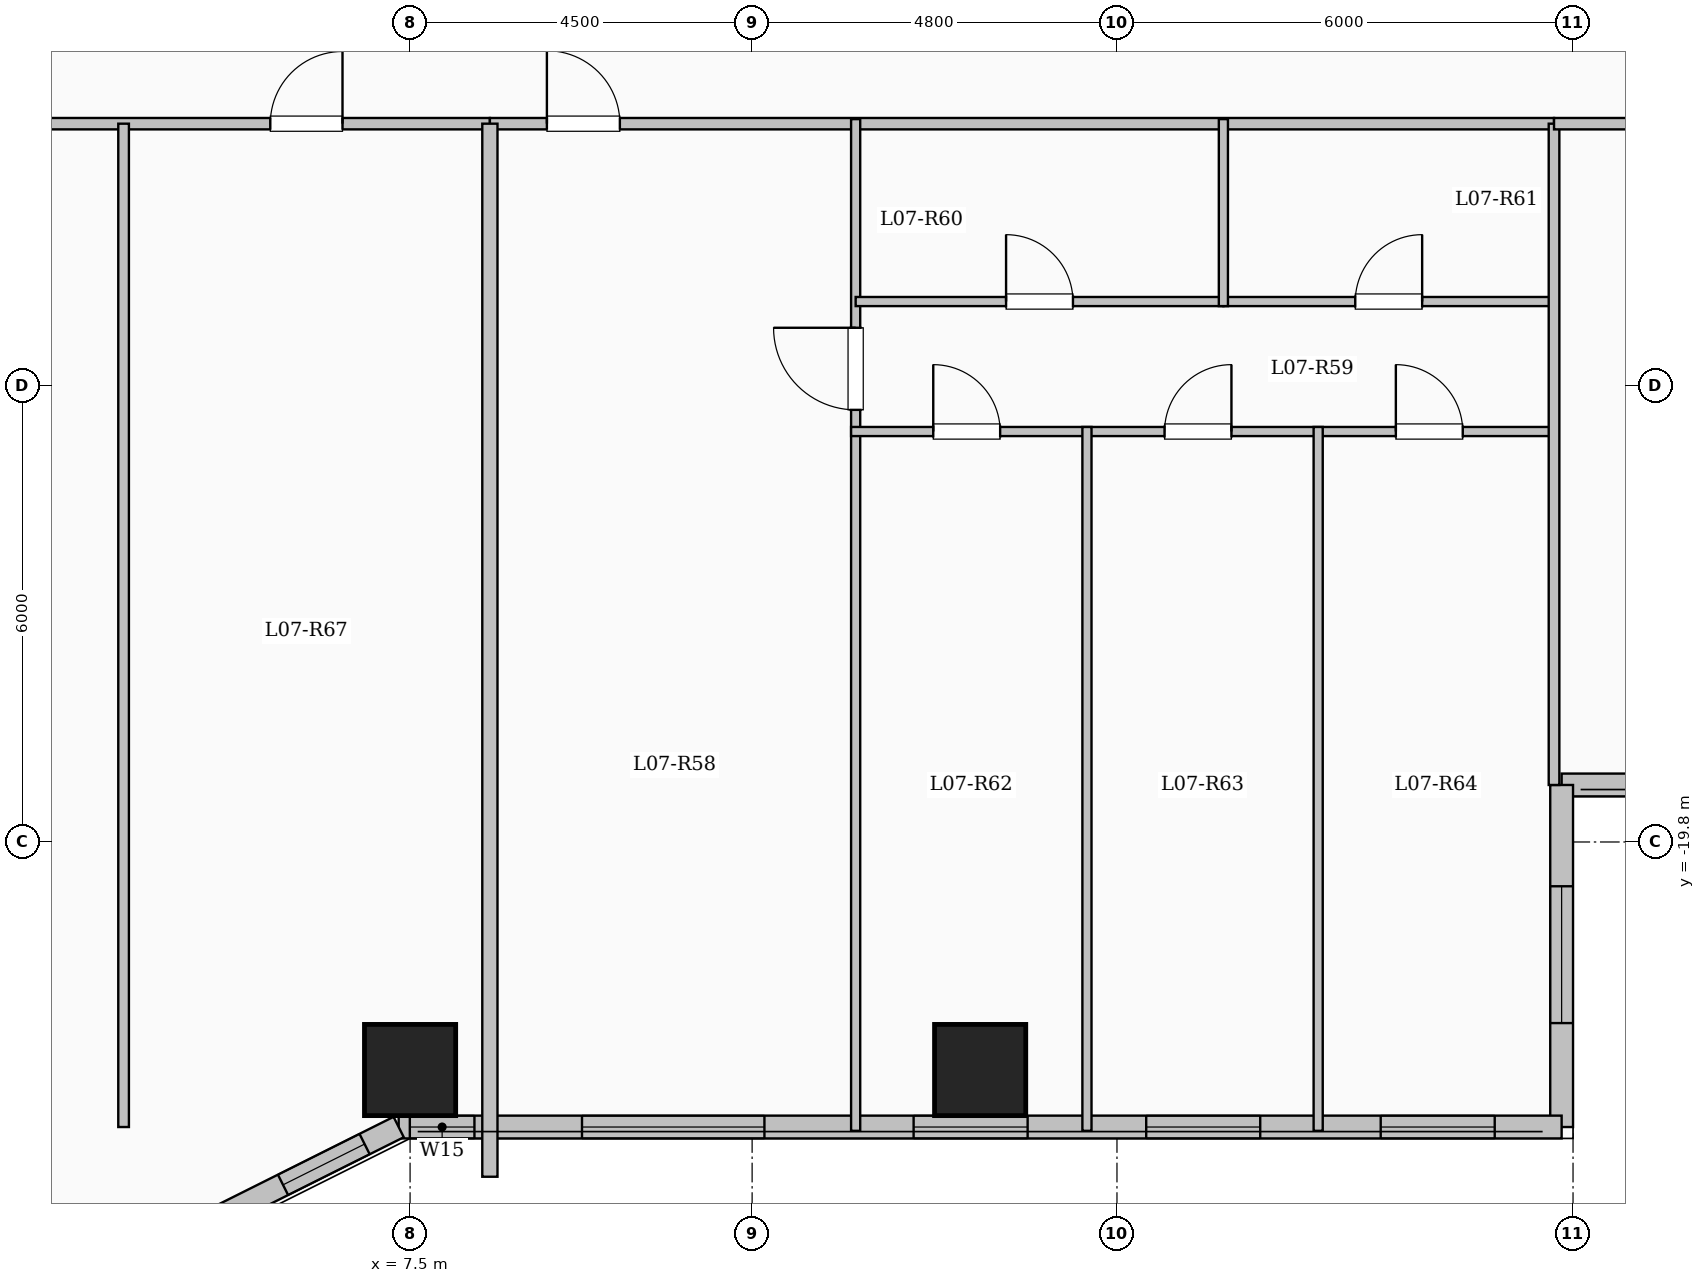
"""IFC4 building model, lengths in metres.
Left out: names, types, materials, properties, quantities, classifications, styles, units other than length and angle.
Written with IfcOpenShell. Run it as: python <this file> out.ifc"""

import sys

from ifc_helpers import new_model, si_unit, direction, frame, frame_2d, origin, origin_2d, place, context, subcontext, project, spatial, rectangle, extrude, element, fill, save


model = new_model("IFC4")
c1 = context("Model", 3, precision=1e-05, world=origin(), true_north=direction((0.0, 1.0)))
c2 = subcontext(c1, "Body", "Model", "MODEL_VIEW")
j1 = project(units=[si_unit("LENGTHUNIT", "METRE"), si_unit("PLANEANGLEUNIT", "RADIAN")], contexts=[c1])
p1 = place(None, origin())
s1 = spatial("IfcSite", under=j1, at=p1, CompositionType="ELEMENT")
p2 = place(p1, origin())
s2 = spatial("IfcBuilding", under=s1, at=p2, CompositionType="ELEMENT")
p3 = place(p2, frame((0.0, 0.0, 30.7)))
s3 = spatial("IfcBuildingStorey", under=s2, at=p3, CompositionType="ELEMENT", Elevation=30.7)
for number, where, z_axis, x_axis in (
    (1, (7.5, -22.8, 0.0), (0.0, 0.0, 1.0), (1.0, 0.0, 0.0)),
    (2, (15.0, -22.8, 0.0), (0.0, 0.0, 1.0), (1.0, 0.0, 0.0)),
):
    element("IfcColumn", number, at=place(p3, frame(where, z_axis=z_axis, x_axis=x_axis)), inside=s3, PredefinedType="COLUMN", context=c2, shape_type="SweptSolid", body=[
        extrude(rectangle(XDim=1.2, YDim=1.2, at=origin_2d()), origin(), (0.0, 0.0, 1.0), 3.35),
    ])
p4 = place(p3, frame((28.65, -19.05, 0.0), z_axis=(0.0, 0.0, 1.0), x_axis=(-1.0, 0.0, 0.0)))
e3 = element("IfcWall", 3, at=p4, inside=s3, PredefinedType="SOLIDWALL", context=c2, shape_type="SweptSolid", body=[
    extrude(rectangle(XDim=6.0, YDim=0.3, at=frame_2d((3.0, 0.0))), origin(), (0.0, 0.0, 1.0), 3.1),
])
p5 = place(p4, frame((1.825, 0.0, 0.9)))
e4 = element("IfcOpeningElement", 4, at=p5, cuts=e3, PredefinedType="OPENING", context=c2, shape_type="SweptSolid", body=[
    extrude(rectangle(XDim=2.4, YDim=1.8, at=frame_2d((1.2, 0.9))), frame((0.0, 0.16, 0.0), z_axis=(0.0, -1.0, 0.0), x_axis=(1.0, 0.0, 0.0)), (0.0, 0.0, 1.0), 0.32),
])
p6 = place(p3, frame((22.65, -19.05, 0.0), z_axis=(0.0, 0.0, 1.0), x_axis=(0.0, -1.0, 0.0)))
e5 = element("IfcWall", 5, at=p6, inside=s3, PredefinedType="SOLIDWALL", context=c2, shape_type="SweptSolid", body=[
    extrude(rectangle(XDim=4.5, YDim=0.3, at=frame_2d((2.25, 0.0))), origin(), (0.0, 0.0, 1.0), 3.1),
])
p7 = place(p6, frame((1.333, 0.0, 0.9)))
e6 = element("IfcOpeningElement", 6, at=p7, cuts=e5, PredefinedType="OPENING", context=c2, shape_type="SweptSolid", body=[
    extrude(rectangle(XDim=1.8, YDim=1.65, at=frame_2d((0.9, 0.825))), frame((0.0, 0.16, 0.0), z_axis=(0.0, -1.0, 0.0), x_axis=(1.0, 0.0, 0.0)), (0.0, 0.0, 1.0), 0.32),
])
p8 = place(p3, frame((22.65, -23.55, 0.0), z_axis=(0.0, 0.0, 1.0), x_axis=(-1.0, 0.0, 0.0)))
e7 = element("IfcWall", 7, at=p8, inside=s3, PredefinedType="SOLIDWALL", context=c2, shape_type="SweptSolid", body=[
    extrude(rectangle(XDim=15.3, YDim=0.3, at=frame_2d((7.65, 0.0))), origin(), (0.0, 0.0, 1.0), 3.1),
])
p9 = place(p8, frame((0.88, 0.0, 0.9)))
e8 = element("IfcOpeningElement", 8, at=p9, cuts=e7, PredefinedType="OPENING", context=c2, shape_type="SweptSolid", body=[
    extrude(rectangle(XDim=1.5, YDim=1.65, at=frame_2d((0.75, 0.825))), frame((0.0, 0.16, 0.0), z_axis=(0.0, -1.0, 0.0), x_axis=(1.0, 0.0, 0.0)), (0.0, 0.0, 1.0), 0.32),
])
p10 = place(p8, frame((3.965, 0.0, 0.9)))
e9 = element("IfcOpeningElement", 9, at=p10, cuts=e7, PredefinedType="OPENING", context=c2, shape_type="SweptSolid", body=[
    extrude(rectangle(XDim=1.5, YDim=1.65, at=frame_2d((0.75, 0.825))), frame((0.0, 0.16, 0.0), z_axis=(0.0, -1.0, 0.0), x_axis=(1.0, 0.0, 0.0)), (0.0, 0.0, 1.0), 0.32),
])
p11 = place(p8, frame((7.025, 0.0, 0.9)))
e10 = element("IfcOpeningElement", 10, at=p11, cuts=e7, PredefinedType="OPENING", context=c2, shape_type="SweptSolid", body=[
    extrude(rectangle(XDim=1.5, YDim=1.65, at=frame_2d((0.75, 0.825))), frame((0.0, 0.16, 0.0), z_axis=(0.0, -1.0, 0.0), x_axis=(1.0, 0.0, 0.0)), (0.0, 0.0, 1.0), 0.32),
])
p12 = place(p8, frame((10.488, 0.0, 0.9)))
e11 = element("IfcOpeningElement", 11, at=p12, cuts=e7, PredefinedType="OPENING", context=c2, shape_type="SweptSolid", body=[
    extrude(rectangle(XDim=2.4, YDim=1.8, at=frame_2d((1.2, 0.9))), frame((0.0, 0.16, 0.0), z_axis=(0.0, -1.0, 0.0), x_axis=(1.0, 0.0, 0.0)), (0.0, 0.0, 1.0), 0.32),
])
p13 = place(p8, frame((14.303, 0.0, 0.95)))
e12 = element("IfcOpeningElement", 12, at=p13, cuts=e7, PredefinedType="OPENING", context=c2, shape_type="SweptSolid", body=[
    extrude(rectangle(XDim=0.85, YDim=1.5, at=frame_2d((0.425, 0.75))), frame((0.0, 0.16, 0.0), z_axis=(0.0, -1.0, 0.0), x_axis=(1.0, 0.0, 0.0)), (0.0, 0.0, 1.0), 0.32),
])
p14 = place(p3, frame((7.35, -23.55, 0.0), z_axis=(0.0, 0.0, 1.0), x_axis=(-0.894427191, -0.4472135955, 0.0)))
e13 = element("IfcWall", 13, at=p14, inside=s3, PredefinedType="SOLIDWALL", context=c2, shape_type="SweptSolid", body=[
    extrude(rectangle(XDim=3.354, YDim=0.3, at=frame_2d((1.677, 0.0))), origin(), (0.0, 0.0, 1.0), 3.1),
])
p15 = place(p14, frame((0.501, 0.0, 0.95)))
e14 = element("IfcOpeningElement", 14, at=p15, cuts=e13, PredefinedType="OPENING", context=c2, shape_type="SweptSolid", body=[
    extrude(rectangle(XDim=1.2, YDim=1.5, at=frame_2d((0.6, 0.75))), frame((0.0, 0.16, 0.0), z_axis=(0.0, -1.0, 0.0), x_axis=(1.0, 0.0, 0.0)), (0.0, 0.0, 1.0), 0.32),
])
p16 = place(p3, frame((-8.55, -10.35, 0.0), z_axis=(0.0, 0.0, 1.0), x_axis=(1.0, 0.0, 0.0)))
e15 = element("IfcWall", 15, at=p16, inside=s3, PredefinedType="PARTITIONING", context=c2, shape_type="SweptSolid", body=[
    extrude(rectangle(XDim=17.1, YDim=0.15, at=frame_2d((8.55, 0.0))), origin(), (0.0, 0.0, 1.0), 3.1),
])
p17 = place(p16, frame((2.618, 0.0, 0.0)))
e16 = element("IfcOpeningElement", 16, at=p17, cuts=e15, PredefinedType="OPENING", context=c2, shape_type="SweptSolid", body=[
    extrude(rectangle(XDim=0.95, YDim=2.15, at=frame_2d((0.475, 1.075))), frame((0.0, 0.085, 0.0), z_axis=(0.0, -1.0, 0.0), x_axis=(1.0, 0.0, 0.0)), (0.0, 0.0, 1.0), 0.17),
])
p18 = place(p16, frame((8.754, 0.0, 0.0)))
e17 = element("IfcOpeningElement", 17, at=p18, cuts=e15, PredefinedType="OPENING", context=c2, shape_type="SweptSolid", body=[
    extrude(rectangle(XDim=0.95, YDim=2.15, at=frame_2d((0.475, 1.075))), frame((0.0, 0.085, 0.0), z_axis=(0.0, -1.0, 0.0), x_axis=(1.0, 0.0, 0.0)), (0.0, 0.0, 1.0), 0.17),
])
p19 = place(p16, frame((14.211, 0.0, 0.0)))
e18 = element("IfcOpeningElement", 18, at=p19, cuts=e15, PredefinedType="OPENING", context=c2, shape_type="SweptSolid", body=[
    extrude(rectangle(XDim=0.95, YDim=2.15, at=frame_2d((0.475, 1.075))), frame((0.0, 0.085, 0.0), z_axis=(0.0, -1.0, 0.0), x_axis=(1.0, 0.0, 0.0)), (0.0, 0.0, 1.0), 0.17),
])
p20 = place(p3, frame((8.55, -10.35, 0.0), z_axis=(0.0, 0.0, 1.0), x_axis=(1.0, 0.0, 0.0)))
e19 = element("IfcWall", 19, at=p20, inside=s3, PredefinedType="PARTITIONING", context=c2, shape_type="SweptSolid", body=[
    extrude(rectangle(XDim=14.0, YDim=0.15, at=frame_2d((7.0, 0.0))), origin(), (0.0, 0.0, 1.0), 3.1),
])
p21 = place(p20, frame((0.75, 0.0, 0.0)))
e20 = element("IfcOpeningElement", 20, at=p21, cuts=e19, PredefinedType="OPENING", context=c2, shape_type="SweptSolid", body=[
    extrude(rectangle(XDim=0.96, YDim=2.15, at=frame_2d((0.48, 1.075))), frame((0.0, 0.085, 0.0), z_axis=(0.0, -1.0, 0.0), x_axis=(1.0, 0.0, 0.0)), (0.0, 0.0, 1.0), 0.17),
])
p22 = place(p3, frame((13.362, -23.6, 0.0), z_axis=(0.0, 0.0, 1.0), x_axis=(0.0, 1.0, 0.0)))
e21 = element("IfcWall", 21, at=p22, inside=s3, PredefinedType="PARTITIONING", context=c2, shape_type="SweptSolid", body=[
    extrude(rectangle(XDim=13.31, YDim=0.12, at=frame_2d((6.655, 0.0))), origin(), (0.0, 0.0, 1.0), 3.1),
])
p23 = place(p22, frame((9.485, 0.0, 0.0)))
e22 = element("IfcOpeningElement", 22, at=p23, cuts=e21, PredefinedType="OPENING", context=c2, shape_type="SweptSolid", body=[
    extrude(rectangle(XDim=1.08, YDim=2.15, at=frame_2d((0.54, 1.075))), frame((0.0, 0.07, 0.0), z_axis=(0.0, -1.0, 0.0), x_axis=(1.0, 0.0, 0.0)), (0.0, 0.0, 1.0), 0.14),
])
p24 = place(p3, frame((13.362, -12.69, 0.0), z_axis=(0.0, 0.0, 1.0), x_axis=(1.0, 0.0, 0.0)))
e23 = element("IfcWall", 23, at=p24, inside=s3, PredefinedType="PARTITIONING", context=c2, shape_type="SweptSolid", body=[
    extrude(rectangle(XDim=4.838, YDim=0.12, at=frame_2d((2.419, 0.0))), origin(), (0.0, 0.0, 1.0), 2.585),
])
p25 = place(p24, frame((1.979, 0.0, 0.0)))
e24 = element("IfcOpeningElement", 24, at=p25, cuts=e23, PredefinedType="OPENING", context=c2, shape_type="SweptSolid", body=[
    extrude(rectangle(XDim=0.88, YDim=2.1, at=frame_2d((0.44, 1.05))), frame((0.0, 0.07, 0.0), z_axis=(0.0, -1.0, 0.0), x_axis=(1.0, 0.0, 0.0)), (0.0, 0.0, 1.0), 0.14),
])
p26 = place(p3, frame((18.2, -12.69, 0.0), z_axis=(0.0, 0.0, 1.0), x_axis=(1.0, 0.0, 0.0)))
e25 = element("IfcWall", 25, at=p26, inside=s3, PredefinedType="PARTITIONING", context=c2, shape_type="SweptSolid", body=[
    extrude(rectangle(XDim=4.35, YDim=0.12, at=frame_2d((2.175, 0.0))), origin(), (0.0, 0.0, 1.0), 3.1),
])
p27 = place(p26, frame((1.735, 0.0, 0.0)))
e26 = element("IfcOpeningElement", 26, at=p27, cuts=e25, PredefinedType="OPENING", context=c2, shape_type="SweptSolid", body=[
    extrude(rectangle(XDim=0.88, YDim=2.1, at=frame_2d((0.44, 1.05))), frame((0.0, 0.07, 0.0), z_axis=(0.0, -1.0, 0.0), x_axis=(1.0, 0.0, 0.0)), (0.0, 0.0, 1.0), 0.14),
])
p28 = place(p3, frame((13.302, -14.4, 0.0), z_axis=(0.0, 0.0, 1.0), x_axis=(1.0, 0.0, 0.0)))
e27 = element("IfcWall", 27, at=p28, inside=s3, PredefinedType="PARTITIONING", context=c2, shape_type="SweptSolid", body=[
    extrude(rectangle(XDim=9.308, YDim=0.12, at=frame_2d((4.654, 0.0))), origin(), (0.0, 0.0, 1.0), 3.1),
])
p29 = place(p28, frame((1.081, 0.0, 0.0)))
e28 = element("IfcOpeningElement", 28, at=p29, cuts=e27, PredefinedType="OPENING", context=c2, shape_type="SweptSolid", body=[
    extrude(rectangle(XDim=0.88, YDim=2.1, at=frame_2d((0.44, 1.05))), frame((0.0, 0.07, 0.0), z_axis=(0.0, -1.0, 0.0), x_axis=(1.0, 0.0, 0.0)), (0.0, 0.0, 1.0), 0.14),
])
p30 = place(p28, frame((4.124, 0.0, 0.0)))
e29 = element("IfcOpeningElement", 29, at=p30, cuts=e27, PredefinedType="OPENING", context=c2, shape_type="SweptSolid", body=[
    extrude(rectangle(XDim=0.88, YDim=2.1, at=frame_2d((0.44, 1.05))), frame((0.0, 0.07, 0.0), z_axis=(0.0, -1.0, 0.0), x_axis=(1.0, 0.0, 0.0)), (0.0, 0.0, 1.0), 0.14),
])
p31 = place(p28, frame((7.167, 0.0, 0.0)))
e30 = element("IfcOpeningElement", 30, at=p31, cuts=e27, PredefinedType="OPENING", context=c2, shape_type="SweptSolid", body=[
    extrude(rectangle(XDim=0.88, YDim=2.1, at=frame_2d((0.44, 1.05))), frame((0.0, 0.07, 0.0), z_axis=(0.0, -1.0, 0.0), x_axis=(1.0, 0.0, 0.0)), (0.0, 0.0, 1.0), 0.14),
])
p32 = place(p3, frame((18.2, -12.75, 0.0), z_axis=(0.0, 0.0, 1.0), x_axis=(0.0, 1.0, 0.0)))
e31 = element("IfcWall", 31, at=p32, inside=s3, PredefinedType="PARTITIONING", context=c2, shape_type="SweptSolid", body=[
    extrude(rectangle(XDim=2.46, YDim=0.12, at=frame_2d((1.23, 0.0))), origin(), (0.0, 0.0, 1.0), 3.1),
])
for number, where, z_axis, x_axis in (
    (32, (16.405, -23.6, 0.0), (0.0, 0.0, 1.0), (0.0, 1.0, 0.0)),
    (33, (19.447, -23.6, 0.0), (0.0, 0.0, 1.0), (0.0, 1.0, 0.0)),
):
    element("IfcWall", number, at=place(p3, frame(where, z_axis=z_axis, x_axis=x_axis)), inside=s3, PredefinedType="PARTITIONING", context=c2, shape_type="SweptSolid", body=[
        extrude(rectangle(XDim=9.26, YDim=0.12, at=frame_2d((4.63, 0.0))), origin(), (0.0, 0.0, 1.0), 3.1),
    ])
p33 = place(p3, frame((8.55, -24.204, 0.0), z_axis=(0.0, 0.0, 1.0), x_axis=(0.0, 1.0, 0.0)))
e34 = element("IfcWall", 34, at=p33, inside=s3, PredefinedType="SOLIDWALL", context=c2, shape_type="SweptSolid", body=[
    extrude(rectangle(XDim=13.854, YDim=0.2, at=frame_2d((6.927, 0.0))), origin(), (0.0, 0.0, 1.0), 3.1),
])
p34 = place(p3, frame((3.731, -23.55, 0.0), z_axis=(0.0, 0.0, 1.0), x_axis=(0.0, 1.0, 0.0)))
e35 = element("IfcWall", 35, at=p34, inside=s3, PredefinedType="PARTITIONING", context=c2, shape_type="SweptSolid", body=[
    extrude(rectangle(XDim=13.2, YDim=0.14, at=frame_2d((6.6, 0.0))), origin(), (0.0, 0.0, 1.0), 3.1),
])
p35 = place(p3, frame((22.55, -19.05, 0.0), z_axis=(0.0, 0.0, 1.0), x_axis=(0.0, 1.0, 0.0)))
e36 = element("IfcWall", 36, at=p35, inside=s3, PredefinedType="PARTITIONING", context=c2, shape_type="SweptSolid", body=[
    extrude(rectangle(XDim=8.7, YDim=0.14, at=frame_2d((4.35, 0.0))), origin(), (0.0, 0.0, 1.0), 3.1),
])
p36 = place(p3, frame((22.55, -10.35, 0.0), z_axis=(0.0, 0.0, 1.0), x_axis=(1.0, 0.0, 0.0)))
e37 = element("IfcWall", 37, at=p36, inside=s3, PredefinedType="PARTITIONING", context=c2, shape_type="SweptSolid", body=[
    extrude(rectangle(XDim=6.13, YDim=0.15, at=frame_2d((3.065, 0.0))), origin(), (0.0, 0.0, 1.0), 3.1),
])
p37 = place(p36, frame((2.59, 0.0, 0.0)))
e38 = element("IfcOpeningElement", 38, at=p37, cuts=e37, PredefinedType="OPENING", context=c2, shape_type="SweptSolid", body=[
    extrude(rectangle(XDim=0.95, YDim=2.15, at=frame_2d((0.475, 1.075))), frame((0.0, 0.085, 0.0), z_axis=(0.0, -1.0, 0.0), x_axis=(1.0, 0.0, 0.0)), (0.0, 0.0, 1.0), 0.17),
])
p38 = place(p7, origin())
e39 = element("IfcWindow", 39, at=p38, inside=s3, PartitioningType="SINGLE_PANEL", PredefinedType="WINDOW", context=c2, shape_type="SweptSolid", body=[
    extrude(rectangle(XDim=1.8, YDim=1.65, at=frame_2d((0.9, 0.825))), frame((0.0, 0.03, 0.0), z_axis=(0.0, -1.0, 0.0), x_axis=(1.0, 0.0, 0.0)), (0.0, 0.0, 1.0), 0.06),
])
fill(e6, e39)
p39 = place(p9, origin())
e40 = element("IfcWindow", 40, at=p39, inside=s3, PartitioningType="SINGLE_PANEL", PredefinedType="WINDOW", context=c2, shape_type="SweptSolid", body=[
    extrude(rectangle(XDim=1.5, YDim=1.65, at=frame_2d((0.75, 0.825))), frame((0.0, 0.03, 0.0), z_axis=(0.0, -1.0, 0.0), x_axis=(1.0, 0.0, 0.0)), (0.0, 0.0, 1.0), 0.06),
])
fill(e8, e40)
p40 = place(p10, origin())
e41 = element("IfcWindow", 41, at=p40, inside=s3, PartitioningType="SINGLE_PANEL", PredefinedType="WINDOW", context=c2, shape_type="SweptSolid", body=[
    extrude(rectangle(XDim=1.5, YDim=1.65, at=frame_2d((0.75, 0.825))), frame((0.0, 0.03, 0.0), z_axis=(0.0, -1.0, 0.0), x_axis=(1.0, 0.0, 0.0)), (0.0, 0.0, 1.0), 0.06),
])
fill(e9, e41)
p41 = place(p11, origin())
e42 = element("IfcWindow", 42, at=p41, inside=s3, PartitioningType="SINGLE_PANEL", PredefinedType="WINDOW", context=c2, shape_type="SweptSolid", body=[
    extrude(rectangle(XDim=1.5, YDim=1.65, at=frame_2d((0.75, 0.825))), frame((0.0, 0.03, 0.0), z_axis=(0.0, -1.0, 0.0), x_axis=(1.0, 0.0, 0.0)), (0.0, 0.0, 1.0), 0.06),
])
fill(e10, e42)
p42 = place(p12, origin())
e43 = element("IfcWindow", 43, at=p42, inside=s3, PartitioningType="SINGLE_PANEL", PredefinedType="WINDOW", context=c2, shape_type="SweptSolid", body=[
    extrude(rectangle(XDim=2.4, YDim=1.8, at=frame_2d((1.2, 0.9))), frame((0.0, 0.03, 0.0), z_axis=(0.0, -1.0, 0.0), x_axis=(1.0, 0.0, 0.0)), (0.0, 0.0, 1.0), 0.06),
])
fill(e11, e43)
p43 = place(p13, origin())
e44 = element("IfcWindow", 44, at=p43, inside=s3, PartitioningType="SINGLE_PANEL", PredefinedType="WINDOW", context=c2, shape_type="SweptSolid", body=[
    extrude(rectangle(XDim=0.85, YDim=1.5, at=frame_2d((0.425, 0.75))), frame((0.0, 0.03, 0.0), z_axis=(0.0, -1.0, 0.0), x_axis=(1.0, 0.0, 0.0)), (0.0, 0.0, 1.0), 0.06),
])
fill(e12, e44)
p44 = place(p15, origin())
e45 = element("IfcWindow", 45, at=p44, inside=s3, PartitioningType="SINGLE_PANEL", PredefinedType="WINDOW", context=c2, shape_type="SweptSolid", body=[
    extrude(rectangle(XDim=1.2, YDim=1.5, at=frame_2d((0.6, 0.75))), frame((0.0, 0.03, 0.0), z_axis=(0.0, -1.0, 0.0), x_axis=(1.0, 0.0, 0.0)), (0.0, 0.0, 1.0), 0.06),
])
fill(e14, e45)
p45 = place(p21, origin())
e46 = element("IfcDoor", 46, at=p45, inside=s3, OperationType="SINGLE_SWING_LEFT", PredefinedType="DOOR", context=c2, shape_type="SweptSolid", body=[
    extrude(rectangle(XDim=0.96, YDim=2.15, at=frame_2d((0.48, 1.075))), frame((0.0, 0.025, 0.0), z_axis=(0.0, -1.0, 0.0), x_axis=(1.0, 0.0, 0.0)), (0.0, 0.0, 1.0), 0.05),
])
fill(e20, e46)
p46 = place(p23, origin())
e47 = element("IfcDoor", 47, at=p46, inside=s3, OperationType="SINGLE_SWING_RIGHT", PredefinedType="DOOR", context=c2, shape_type="SweptSolid", body=[
    extrude(rectangle(XDim=1.08, YDim=2.15, at=frame_2d((0.54, 1.075))), frame((0.0, 0.025, 0.0), z_axis=(0.0, -1.0, 0.0), x_axis=(1.0, 0.0, 0.0)), (0.0, 0.0, 1.0), 0.05),
])
fill(e22, e47)
p47 = place(p25, origin())
e48 = element("IfcDoor", 48, at=p47, inside=s3, OperationType="SINGLE_SWING_LEFT", PredefinedType="DOOR", context=c2, shape_type="SweptSolid", body=[
    extrude(rectangle(XDim=0.88, YDim=2.1, at=frame_2d((0.44, 1.05))), frame((0.0, 0.025, 0.0), z_axis=(0.0, -1.0, 0.0), x_axis=(1.0, 0.0, 0.0)), (0.0, 0.0, 1.0), 0.05),
])
fill(e24, e48)
p48 = place(p27, origin())
e49 = element("IfcDoor", 49, at=p48, inside=s3, OperationType="SINGLE_SWING_RIGHT", PredefinedType="DOOR", context=c2, shape_type="SweptSolid", body=[
    extrude(rectangle(XDim=0.88, YDim=2.1, at=frame_2d((0.44, 1.05))), frame((0.0, 0.025, 0.0), z_axis=(0.0, -1.0, 0.0), x_axis=(1.0, 0.0, 0.0)), (0.0, 0.0, 1.0), 0.05),
])
fill(e26, e49)
p49 = place(p29, origin())
e50 = element("IfcDoor", 50, at=p49, inside=s3, OperationType="SINGLE_SWING_LEFT", PredefinedType="DOOR", context=c2, shape_type="SweptSolid", body=[
    extrude(rectangle(XDim=0.88, YDim=2.1, at=frame_2d((0.44, 1.05))), frame((0.0, 0.025, 0.0), z_axis=(0.0, -1.0, 0.0), x_axis=(1.0, 0.0, 0.0)), (0.0, 0.0, 1.0), 0.05),
])
fill(e28, e50)
p50 = place(p30, origin())
e51 = element("IfcDoor", 51, at=p50, inside=s3, OperationType="SINGLE_SWING_RIGHT", PredefinedType="DOOR", context=c2, shape_type="SweptSolid", body=[
    extrude(rectangle(XDim=0.88, YDim=2.1, at=frame_2d((0.44, 1.05))), frame((0.0, 0.025, 0.0), z_axis=(0.0, -1.0, 0.0), x_axis=(1.0, 0.0, 0.0)), (0.0, 0.0, 1.0), 0.05),
])
fill(e29, e51)
p51 = place(p31, origin())
e52 = element("IfcDoor", 52, at=p51, inside=s3, OperationType="SINGLE_SWING_LEFT", PredefinedType="DOOR", context=c2, shape_type="SweptSolid", body=[
    extrude(rectangle(XDim=0.88, YDim=2.1, at=frame_2d((0.44, 1.05))), frame((0.0, 0.025, 0.0), z_axis=(0.0, -1.0, 0.0), x_axis=(1.0, 0.0, 0.0)), (0.0, 0.0, 1.0), 0.05),
])
fill(e30, e52)
p52 = place(p19, origin())
e53 = element("IfcDoor", 53, at=p52, inside=s3, OperationType="SINGLE_SWING_RIGHT", PredefinedType="DOOR", context=c2, shape_type="SweptSolid", body=[
    extrude(rectangle(XDim=0.95, YDim=2.15, at=frame_2d((0.475, 1.075))), frame((0.0, 0.025, 0.0), z_axis=(0.0, -1.0, 0.0), x_axis=(1.0, 0.0, 0.0)), (0.0, 0.0, 1.0), 0.05),
])
fill(e18, e53)
save(model, sys.argv[1])
